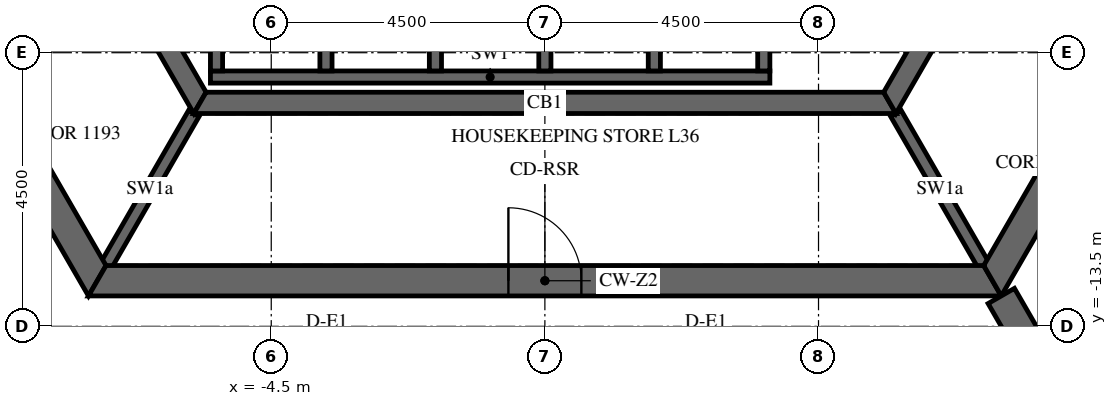
"""IFC4 building model, lengths in metres.
Left out: names, types, materials, properties, quantities, classifications, styles, units other than length and angle.
Written with IfcOpenShell. Run it as: python <this file> out.ifc"""

import sys

from ifc_helpers import new_model, si_unit, direction, frame, frame_2d, origin, place, context, subcontext, project, spatial, polyline, rectangle, outline, extrude, element, fill, save


model = new_model("IFC4")
c1 = context("Model", 3, precision=1e-05, world=origin(), true_north=direction((0.0, 1.0)))
c2 = subcontext(c1, "Body", "Model", "MODEL_VIEW")
j1 = project(units=[si_unit("LENGTHUNIT", "METRE"), si_unit("PLANEANGLEUNIT", "RADIAN")], contexts=[c1])
p1 = place(None, origin())
s1 = spatial("IfcSite", under=j1, at=p1, CompositionType="ELEMENT")
p2 = place(p1, origin())
s2 = spatial("IfcBuilding", under=s1, at=p2, CompositionType="ELEMENT")
p3 = place(p2, frame((0.0, 0.0, 156.6)))
s3 = spatial("IfcBuildingStorey", under=s2, at=p3, CompositionType="ELEMENT", Elevation=156.6)
p4 = place(p3, frame((-14.722, 0.0, -0.15), z_axis=(0.0, 0.0, 1.0), x_axis=(0.50000571537, -0.866022103989, 0.0)))
e1 = element("IfcWall", 1, at=p4, inside=s3, PredefinedType="SHEAR", context=c2, shape_type="SweptSolid", body=[
    extrude(outline(polyline([(-0.144, -0.25), (14.867, -0.25), (14.578, 0.25), (0.144, 0.25), (-0.144, -0.25)])), origin(), (0.0, 0.0, 1.0), 3.9),
])
p5 = place(p4, frame((6.432, 0.0, 0.15)))
e2 = element("IfcOpeningElement", 2, at=p5, cuts=e1, PredefinedType="OPENING", context=c2, shape_type="SweptSolid", body=[
    extrude(rectangle(XDim=1.8, YDim=2.4, at=frame_2d((0.9, 1.2))), frame((0.0, 0.26, 0.0), z_axis=(0.0, -1.0, 0.0), x_axis=(1.0, 0.0, 0.0)), (0.0, 0.0, 1.0), 0.52),
])
p6 = place(p3, frame((-7.361, -12.75, -0.15), z_axis=(0.0, 0.0, 1.0), x_axis=(1.0, 0.0, 0.0)))
e3 = element("IfcWall", 3, at=p6, inside=s3, PredefinedType="SHEAR", context=c2, shape_type="SweptSolid", body=[
    extrude(outline(polyline([(-0.144, -0.25), (14.866, -0.25), (14.578, 0.25), (0.144, 0.25), (-0.144, -0.25)])), origin(), (0.0, 0.0, 1.0), 3.9),
])
p7 = place(p6, frame((6.761, 0.0, 0.15)))
e4 = element("IfcOpeningElement", 4, at=p7, cuts=e3, PredefinedType="OPENING", context=c2, shape_type="SweptSolid", body=[
    extrude(rectangle(XDim=1.2, YDim=2.4, at=frame_2d((0.6, 1.2))), frame((0.0, 0.26, 0.0), z_axis=(0.0, -1.0, 0.0), x_axis=(1.0, 0.0, 0.0)), (0.0, 0.0, 1.0), 0.52),
])
p8 = place(p3, frame((7.361, -12.75, -0.15), z_axis=(0.0, 0.0, 1.0), x_axis=(0.50000571537, 0.866022103989, 0.0)))
e5 = element("IfcWall", 5, at=p8, inside=s3, PredefinedType="SHEAR", context=c2, shape_type="SweptSolid", body=[
    extrude(outline(polyline([(-0.144, -0.25), (14.867, -0.25), (14.578, 0.25), (0.144, 0.25), (-0.144, -0.25)])), origin(), (0.0, 0.0, 1.0), 3.9),
])
p9 = place(p8, frame((6.49, 0.0, 0.15)))
e6 = element("IfcOpeningElement", 6, at=p9, cuts=e5, PredefinedType="OPENING", context=c2, shape_type="SweptSolid", body=[
    extrude(rectangle(XDim=1.8, YDim=2.4, at=frame_2d((0.9, 1.2))), frame((0.0, 0.26, 0.0), z_axis=(0.0, -1.0, 0.0), x_axis=(1.0, 0.0, 0.0)), (0.0, 0.0, 1.0), 0.52),
])
p10 = place(p3, frame((7.506, -13.0, -0.15), z_axis=(0.0, 0.0, 1.0), x_axis=(0.499988271576, -0.866032175087, 0.0)))
e7 = element("IfcWall", 7, at=p10, inside=s3, PredefinedType="SHEAR", context=c2, shape_type="SweptSolid", body=[
    extrude(rectangle(XDim=15.424, YDim=0.5, at=frame_2d((7.712, 0.0))), origin(), (0.0, 0.0, 1.0), 3.9),
])
p11 = place(p10, frame((6.812, 0.0, 0.15)))
e8 = element("IfcOpeningElement", 8, at=p11, cuts=e7, PredefinedType="OPENING", context=c2, shape_type="SweptSolid", body=[
    extrude(rectangle(XDim=1.8, YDim=2.4, at=frame_2d((0.9, 1.2))), frame((0.0, 0.26, 0.0), z_axis=(0.0, -1.0, 0.0), x_axis=(1.0, 0.0, 0.0)), (0.0, 0.0, 1.0), 0.52),
])
p12 = place(p3, frame((-11.345, 0.0, -0.15), z_axis=(0.0, 0.0, 1.0), x_axis=(0.499995046907, -0.866028263435, 0.0)))
e9 = element("IfcWall", 9, at=p12, inside=s3, PredefinedType="SHEAR", context=c2, shape_type="SweptSolid", body=[
    extrude(outline(polyline([(-0.101, -0.175), (11.446, -0.175), (11.244, 0.175), (0.101, 0.175), (-0.101, -0.175)])), origin(), (0.0, 0.0, 1.0), 3.9),
])
p13 = place(p12, frame((4.744, 0.0, 0.15)))
e10 = element("IfcOpeningElement", 10, at=p13, cuts=e9, PredefinedType="OPENING", context=c2, shape_type="SweptSolid", body=[
    extrude(rectangle(XDim=1.8, YDim=2.4, at=frame_2d((0.9, 1.2))), frame((0.0, 0.185, 0.0), z_axis=(0.0, -1.0, 0.0), x_axis=(1.0, 0.0, 0.0)), (0.0, 0.0, 1.0), 0.37),
])
p14 = place(p3, frame((-5.673, -9.825, -0.15), z_axis=(0.0, 0.0, 1.0), x_axis=(1.0, 0.0, 0.0)))
e11 = element("IfcWall", 11, at=p14, inside=s3, PredefinedType="SHEAR", context=c2, shape_type="SweptSolid", body=[
    extrude(outline(polyline([(-0.101, -0.175), (11.446, -0.175), (11.244, 0.175), (0.101, 0.175), (-0.101, -0.175)])), origin(), (0.0, 0.0, 1.0), 3.9),
])
p15 = place(p3, frame((5.673, -9.825, -0.15), z_axis=(0.0, 0.0, 1.0), x_axis=(0.499995046907, 0.866028263435, 0.0)))
e12 = element("IfcWall", 12, at=p15, inside=s3, PredefinedType="SHEAR", context=c2, shape_type="SweptSolid", body=[
    extrude(outline(polyline([(-0.101, -0.175), (11.446, -0.175), (11.244, 0.175), (0.101, 0.175), (-0.101, -0.175)])), origin(), (0.0, 0.0, 1.0), 3.9),
])
p16 = place(p15, frame((4.801, 0.0, 0.15)))
e13 = element("IfcOpeningElement", 13, at=p16, cuts=e12, PredefinedType="OPENING", context=c2, shape_type="SweptSolid", body=[
    extrude(rectangle(XDim=1.8, YDim=2.4, at=frame_2d((0.9, 1.2))), frame((0.0, 0.185, 0.0), z_axis=(0.0, -1.0, 0.0), x_axis=(1.0, 0.0, 0.0)), (0.0, 0.0, 1.0), 0.37),
])
p17 = place(p3, frame((-5.5, -9.4, -0.25), z_axis=(0.0, 0.0, 1.0), x_axis=(1.0, 0.0, 0.0)))
e14 = element("IfcWall", 14, at=p17, inside=s3, PredefinedType="SHEAR", context=c2, shape_type="SweptSolid", body=[
    extrude(rectangle(XDim=9.2, YDim=0.2, at=frame_2d((4.6, 0.0))), origin(), (0.0, 0.0, 1.0), 3.9),
])
for number, where, z_axis, x_axis in (
    (15, (-5.4, -9.3, -0.25), (0.0, 0.0, 1.0), (0.0, 1.0, 0.0)),
    (16, (-3.6, -9.3, -0.25), (0.0, 0.0, 1.0), (0.0, 1.0, 0.0)),
    (17, (-1.8, -9.3, -0.25), (0.0, 0.0, 1.0), (0.0, 1.0, 0.0)),
    (18, (0.0, -9.3, -0.25), (0.0, 0.0, 1.0), (0.0, 1.0, 0.0)),
    (19, (1.8, -9.3, -0.25), (0.0, 0.0, 1.0), (0.0, 1.0, 0.0)),
    (20, (3.6, -9.3, -0.25), (0.0, 0.0, 1.0), (0.0, 1.0, 0.0)),
):
    element("IfcWall", number, at=place(p3, frame(where, z_axis=z_axis, x_axis=x_axis)), inside=s3, PredefinedType="SHEAR", context=c2, shape_type="SweptSolid", body=[
        extrude(rectangle(XDim=2.9, YDim=0.2, at=frame_2d((1.45, 0.0))), origin(), (0.0, 0.0, 1.0), 3.9),
    ])
for number, where, z_axis, x_axis in (
    (21, (-5.773, -10.0, -0.15), (0.0, 0.0, 1.0), (-0.5, -0.866, 0.0)),
    (22, (5.773, -10.0, -0.15), (0.0, 0.0, 1.0), (0.5, -0.866, 0.0)),
):
    element("IfcWall", number, at=place(p3, frame(where, z_axis=z_axis, x_axis=x_axis)), inside=s3, PredefinedType="SHEAR", context=c2, shape_type="SweptSolid", body=[
        extrude(rectangle(XDim=2.887, YDim=0.2, at=frame_2d((1.443, 0.0))), origin(), (0.0, 0.0, 1.0), 3.9),
    ])
p18 = place(p7, origin())
e23 = element("IfcDoor", 23, at=p18, inside=s3, OperationType="SINGLE_SWING_LEFT", PredefinedType="DOOR", context=c2, shape_type="SweptSolid", body=[
    extrude(rectangle(XDim=1.2, YDim=2.4, at=frame_2d((0.6, 1.2))), frame((0.0, 0.025, 0.0), z_axis=(0.0, -1.0, 0.0), x_axis=(1.0, 0.0, 0.0)), (0.0, 0.0, 1.0), 0.05),
])
fill(e4, e23)
save(model, sys.argv[1])
